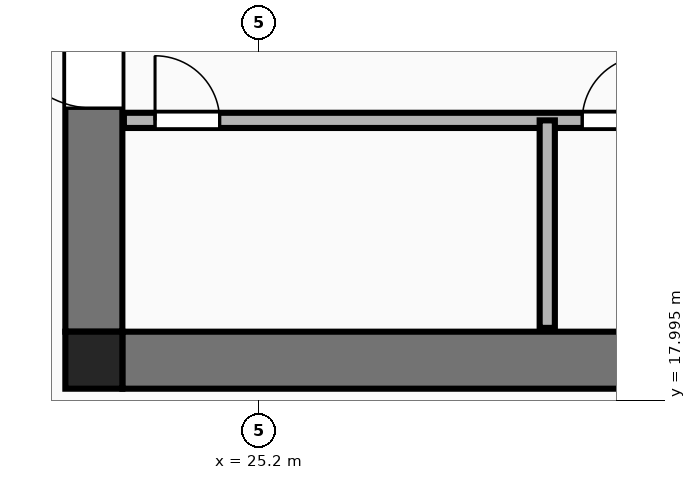
"""IFC4 building model, lengths in metres.
Left out: names, types, materials, properties, quantities, classifications, styles, units other than length and angle.
Written with IfcOpenShell. Run it as: python <this file> out.ifc"""

import sys

from ifc_helpers import new_model, si_unit, direction, frame, frame_2d, origin, origin_2d, place, context, subcontext, project, spatial, rectangle, extrude, element, fill, save


model = new_model("IFC4")
c1 = context("Model", 3, precision=1e-05, world=origin(), true_north=direction((0.0, 1.0)))
c2 = subcontext(c1, "Body", "Model", "MODEL_VIEW")
j1 = project(units=[si_unit("LENGTHUNIT", "METRE"), si_unit("PLANEANGLEUNIT", "RADIAN")], contexts=[c1])
p1 = place(None, origin())
s1 = spatial("IfcSite", under=j1, at=p1, CompositionType="ELEMENT")
p2 = place(p1, origin())
s2 = spatial("IfcBuilding", under=s1, at=p2, CompositionType="ELEMENT")
p3 = place(p2, frame((0.0, 0.0, 116.15)))
s3 = spatial("IfcBuildingStorey", under=s2, at=p3, CompositionType="ELEMENT", Elevation=116.15)
p4 = place(p3, frame((23.025, 18.525, 0.0), z_axis=(0.0, 0.0, 1.0), x_axis=(1.0, 0.0, 0.0)))
e1 = element("IfcColumn", 1, at=p4, inside=s3, PredefinedType="COLUMN", context=c2, shape_type="SweptSolid", body=[
    extrude(rectangle(XDim=0.75, YDim=0.75, at=origin_2d()), origin(), (0.0, 0.0, 1.0), 3.55),
])
p5 = place(p3, frame((23.4, 18.525, 0.0), z_axis=(0.0, 0.0, 1.0), x_axis=(1.0, 0.0, 0.0)))
e2 = element("IfcWall", 2, at=p5, inside=s3, PredefinedType="SHEAR", context=c2, shape_type="SweptSolid", body=[
    extrude(rectangle(XDim=18.0, YDim=0.75, at=frame_2d((9.0, 0.0))), origin(), (0.0, 0.0, 1.0), 3.34),
])
p6 = place(p3, frame((23.025, 18.9, 0.0), z_axis=(0.0, 0.0, 1.0), x_axis=(0.0, 1.0, 0.0)))
e3 = element("IfcWall", 3, at=p6, inside=s3, PredefinedType="SHEAR", context=c2, shape_type="SweptSolid", body=[
    extrude(rectangle(XDim=14.0, YDim=0.75, at=frame_2d((7.0, 0.0))), origin(), (0.0, 0.0, 1.0), 3.34),
])
p7 = place(p6, frame((2.94, 0.0, 0.0)))
e4 = element("IfcOpeningElement", 4, at=p7, cuts=e3, PredefinedType="OPENING", context=c2, shape_type="SweptSolid", body=[
    extrude(rectangle(XDim=1.22, YDim=2.25, at=frame_2d((0.61, 1.125))), frame((0.0, 0.385, 0.0), z_axis=(0.0, -1.0, 0.0), x_axis=(1.0, 0.0, 0.0)), (0.0, 0.0, 1.0), 0.77),
])
p8 = place(p3, frame((23.42, 21.68, 0.0), z_axis=(0.0, 0.0, 1.0), x_axis=(1.0, 0.0, 0.0)))
e5 = element("IfcWall", 5, at=p8, inside=s3, PredefinedType="PLUMBINGWALL", context=c2, shape_type="SweptSolid", body=[
    extrude(rectangle(XDim=17.96, YDim=0.2, at=frame_2d((8.98, 0.0))), origin(), (0.0, 0.0, 1.0), 3.34),
])
p9 = place(p8, frame((11.6, 0.0, 0.0)))
e6 = element("IfcOpeningElement", 6, at=p9, cuts=e5, PredefinedType="OPENING", context=c2, shape_type="SweptSolid", body=[
    extrude(rectangle(XDim=1.1, YDim=2.2, at=frame_2d((0.55, 1.1))), frame((0.0, 0.11, 0.0), z_axis=(0.0, -1.0, 0.0), x_axis=(1.0, 0.0, 0.0)), (0.0, 0.0, 1.0), 0.22),
])
p10 = place(p8, frame((0.41, 0.0, 0.0)))
e7 = element("IfcOpeningElement", 7, at=p10, cuts=e5, PredefinedType="OPENING", context=c2, shape_type="SweptSolid", body=[
    extrude(rectangle(XDim=0.85, YDim=2.05, at=frame_2d((0.425, 1.025))), frame((0.0, 0.11, 0.0), z_axis=(0.0, -1.0, 0.0), x_axis=(1.0, 0.0, 0.0)), (0.0, 0.0, 1.0), 0.22),
])
p11 = place(p8, frame((6.03, 0.0, 0.0)))
e8 = element("IfcOpeningElement", 8, at=p11, cuts=e5, PredefinedType="OPENING", context=c2, shape_type="SweptSolid", body=[
    extrude(rectangle(XDim=0.85, YDim=2.05, at=frame_2d((0.425, 1.025))), frame((0.0, 0.11, 0.0), z_axis=(0.0, -1.0, 0.0), x_axis=(1.0, 0.0, 0.0)), (0.0, 0.0, 1.0), 0.22),
])
p12 = place(p8, frame((13.78, 0.0, 0.0)))
e9 = element("IfcOpeningElement", 9, at=p12, cuts=e5, PredefinedType="OPENING", context=c2, shape_type="SweptSolid", body=[
    extrude(rectangle(XDim=0.85, YDim=2.05, at=frame_2d((0.425, 1.025))), frame((0.0, 0.11, 0.0), z_axis=(0.0, -1.0, 0.0), x_axis=(1.0, 0.0, 0.0)), (0.0, 0.0, 1.0), 0.22),
])
p13 = place(p3, frame((28.99, 18.95, 0.0), z_axis=(0.0, 0.0, 1.0), x_axis=(0.0, 1.0, 0.0)))
e10 = element("IfcWall", 10, at=p13, inside=s3, PredefinedType="PLUMBINGWALL", context=c2, shape_type="SweptSolid", body=[
    extrude(rectangle(XDim=2.73, YDim=0.2, at=frame_2d((1.365, 0.0))), origin(), (0.0, 0.0, 1.0), 3.34),
])
p14 = place(p7, origin())
e11 = element("IfcDoor", 11, at=p14, inside=s3, OperationType="SINGLE_SWING_RIGHT", PredefinedType="DOOR", context=c2, shape_type="SweptSolid", body=[
    extrude(rectangle(XDim=1.22, YDim=2.25, at=frame_2d((0.61, 1.125))), frame((0.0, 0.025, 0.0), z_axis=(0.0, -1.0, 0.0), x_axis=(1.0, 0.0, 0.0)), (0.0, 0.0, 1.0), 0.05),
])
fill(e4, e11)
p15 = place(p10, origin())
e12 = element("IfcDoor", 12, at=p15, inside=s3, OperationType="SINGLE_SWING_LEFT", PredefinedType="DOOR", context=c2, shape_type="SweptSolid", body=[
    extrude(rectangle(XDim=0.85, YDim=2.05, at=frame_2d((0.425, 1.025))), frame((0.0, 0.025, 0.0), z_axis=(0.0, -1.0, 0.0), x_axis=(1.0, 0.0, 0.0)), (0.0, 0.0, 1.0), 0.05),
])
fill(e7, e12)
p16 = place(p11, origin())
e13 = element("IfcDoor", 13, at=p16, inside=s3, OperationType="SINGLE_SWING_RIGHT", PredefinedType="DOOR", context=c2, shape_type="SweptSolid", body=[
    extrude(rectangle(XDim=0.85, YDim=2.05, at=frame_2d((0.425, 1.025))), frame((0.0, 0.025, 0.0), z_axis=(0.0, -1.0, 0.0), x_axis=(1.0, 0.0, 0.0)), (0.0, 0.0, 1.0), 0.05),
])
fill(e8, e13)
save(model, sys.argv[1])
